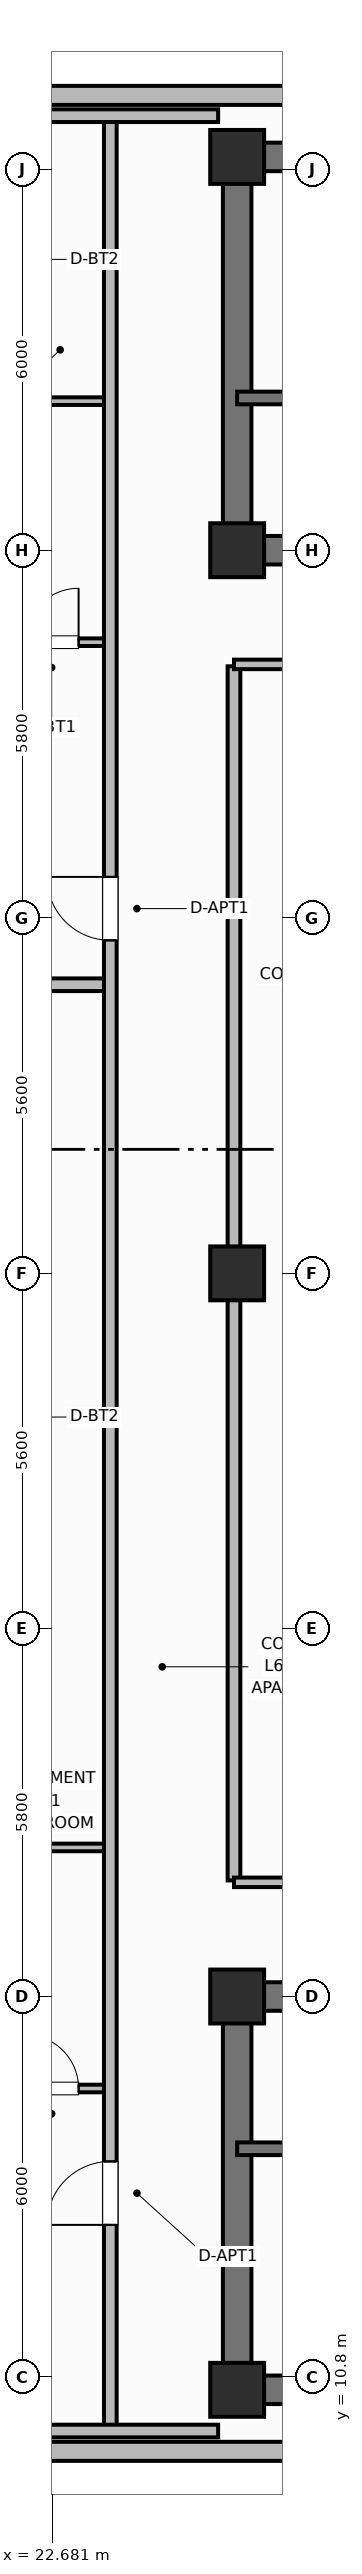
"""IFC4 building model, lengths in metres.
Left out: names, types, materials, properties, quantities, classifications, styles, units other than length and angle.
Written with IfcOpenShell. Run it as: python <this file> out.ifc"""

import sys

from ifc_helpers import new_model, si_unit, direction, frame, frame_2d, origin, origin_2d, place, context, subcontext, project, spatial, rectangle, extrude, element, fill, save


model = new_model("IFC4")
c1 = context("Model", 3, precision=1e-05, world=origin(), true_north=direction((0.0, 1.0)))
c2 = subcontext(c1, "Body", "Model", "MODEL_VIEW")
j1 = project(units=[si_unit("LENGTHUNIT", "METRE"), si_unit("PLANEANGLEUNIT", "RADIAN")], contexts=[c1])
p1 = place(None, origin())
s1 = spatial("IfcSite", under=j1, at=p1, CompositionType="ELEMENT")
p2 = place(p1, origin())
s2 = spatial("IfcBuilding", under=s1, at=p2, CompositionType="ELEMENT")
p3 = place(p2, frame((0.0, 0.0, 248.0)))
s3 = spatial("IfcBuildingStorey", under=s2, at=p3, CompositionType="ELEMENT", Elevation=248.0)
p4 = place(p3, frame((52.8, 10.6, 0.0), z_axis=(0.0, 0.0, 1.0), x_axis=(-1.0, 0.0, 0.0)))
e1 = element("IfcWall", 1, at=p4, inside=s3, PredefinedType="SHEAR", context=c2, shape_type="SweptSolid", body=[
    extrude(rectangle(XDim=27.2, YDim=0.45, at=frame_2d((13.6, 0.0))), origin(), (0.0, 0.0, 1.0), 3.7),
])
p5 = place(p3, frame((25.6, 10.825, 0.0), z_axis=(0.0, 0.0, 1.0), x_axis=(0.0, 1.0, 0.0)))
e2 = element("IfcWall", 2, at=p5, inside=s3, PredefinedType="SHEAR", context=c2, shape_type="SweptSolid", body=[
    extrude(rectangle(XDim=5.75, YDim=0.45, at=frame_2d((2.875, 0.0))), origin(), (0.0, 0.0, 1.0), 3.7),
])
p6 = place(p3, frame((25.6, 16.8, 0.0), z_axis=(0.0, 0.0, 1.0), x_axis=(1.0, 0.0, 0.0)))
e3 = element("IfcWall", 3, at=p6, inside=s3, PredefinedType="SHEAR", context=c2, shape_type="SweptSolid", body=[
    extrude(rectangle(XDim=27.2, YDim=0.45, at=frame_2d((13.6, 0.0))), origin(), (0.0, 0.0, 1.0), 3.7),
])
p7 = place(p6, frame((1.8, 0.0, 0.0)))
e4 = element("IfcOpeningElement", 4, at=p7, cuts=e3, PredefinedType="OPENING", context=c2, shape_type="SweptSolid", body=[
    extrude(rectangle(XDim=1.1, YDim=2.15, at=frame_2d((0.55, 1.075))), frame((0.0, 0.235, 0.0), z_axis=(0.0, -1.0, 0.0), x_axis=(1.0, 0.0, 0.0)), (0.0, 0.0, 1.0), 0.47),
])
p8 = place(p6, frame((5.6, 0.0, 0.0)))
e5 = element("IfcOpeningElement", 5, at=p8, cuts=e3, PredefinedType="OPENING", context=c2, shape_type="SweptSolid", body=[
    extrude(rectangle(XDim=0.85, YDim=2.1, at=frame_2d((0.425, 1.05))), frame((0.0, 0.235, 0.0), z_axis=(0.0, -1.0, 0.0), x_axis=(1.0, 0.0, 0.0)), (0.0, 0.0, 1.0), 0.47),
])
p9 = place(p6, frame((13.0, 0.0, 0.0)))
e6 = element("IfcOpeningElement", 6, at=p9, cuts=e3, PredefinedType="OPENING", context=c2, shape_type="SweptSolid", body=[
    extrude(rectangle(XDim=1.2, YDim=2.15, at=frame_2d((0.6, 1.075))), frame((0.0, 0.235, 0.0), z_axis=(0.0, -1.0, 0.0), x_axis=(1.0, 0.0, 0.0)), (0.0, 0.0, 1.0), 0.47),
])
p10 = place(p6, frame((19.2, 0.0, 0.0)))
e7 = element("IfcOpeningElement", 7, at=p10, cuts=e3, PredefinedType="OPENING", context=c2, shape_type="SweptSolid", body=[
    extrude(rectangle(XDim=0.85, YDim=2.1, at=frame_2d((0.425, 1.05))), frame((0.0, 0.235, 0.0), z_axis=(0.0, -1.0, 0.0), x_axis=(1.0, 0.0, 0.0)), (0.0, 0.0, 1.0), 0.47),
])
p11 = place(p6, frame((23.8, 0.0, 0.0)))
e8 = element("IfcOpeningElement", 8, at=p11, cuts=e3, PredefinedType="OPENING", context=c2, shape_type="SweptSolid", body=[
    extrude(rectangle(XDim=0.9, YDim=2.1, at=frame_2d((0.45, 1.05))), frame((0.0, 0.235, 0.0), z_axis=(0.0, -1.0, 0.0), x_axis=(1.0, 0.0, 0.0)), (0.0, 0.0, 1.0), 0.47),
])
p12 = place(p3, frame((25.6, 45.8, 0.0), z_axis=(0.0, 0.0, 1.0), x_axis=(1.0, 0.0, 0.0)))
e9 = element("IfcWall", 9, at=p12, inside=s3, PredefinedType="SHEAR", context=c2, shape_type="SweptSolid", body=[
    extrude(rectangle(XDim=27.2, YDim=0.45, at=frame_2d((13.6, 0.0))), origin(), (0.0, 0.0, 1.0), 3.7),
])
p13 = place(p3, frame((25.6, 39.825, 0.0), z_axis=(0.0, 0.0, 1.0), x_axis=(0.0, 1.0, 0.0)))
e10 = element("IfcWall", 10, at=p13, inside=s3, PredefinedType="SHEAR", context=c2, shape_type="SweptSolid", body=[
    extrude(rectangle(XDim=5.75, YDim=0.45, at=frame_2d((2.875, 0.0))), origin(), (0.0, 0.0, 1.0), 3.7),
])
p14 = place(p3, frame((52.8, 39.6, 0.0), z_axis=(0.0, 0.0, 1.0), x_axis=(-1.0, 0.0, 0.0)))
e11 = element("IfcWall", 11, at=p14, inside=s3, PredefinedType="SHEAR", context=c2, shape_type="SweptSolid", body=[
    extrude(rectangle(XDim=27.2, YDim=0.45, at=frame_2d((13.6, 0.0))), origin(), (0.0, 0.0, 1.0), 3.7),
])
p15 = place(p14, frame((24.2, 0.0, 0.0)))
e12 = element("IfcOpeningElement", 12, at=p15, cuts=e11, PredefinedType="OPENING", context=c2, shape_type="SweptSolid", body=[
    extrude(rectangle(XDim=1.1, YDim=2.15, at=frame_2d((0.55, 1.075))), frame((0.0, 0.235, 0.0), z_axis=(0.0, -1.0, 0.0), x_axis=(1.0, 0.0, 0.0)), (0.0, 0.0, 1.0), 0.47),
])
p16 = place(p14, frame((20.55, 0.0, 0.0)))
e13 = element("IfcOpeningElement", 13, at=p16, cuts=e11, PredefinedType="OPENING", context=c2, shape_type="SweptSolid", body=[
    extrude(rectangle(XDim=0.95, YDim=2.1, at=frame_2d((0.475, 1.05))), frame((0.0, 0.235, 0.0), z_axis=(0.0, -1.0, 0.0), x_axis=(1.0, 0.0, 0.0)), (0.0, 0.0, 1.0), 0.47),
])
p17 = place(p14, frame((15.1, 0.0, 0.0)))
e14 = element("IfcOpeningElement", 14, at=p17, cuts=e11, PredefinedType="OPENING", context=c2, shape_type="SweptSolid", body=[
    extrude(rectangle(XDim=1.2, YDim=2.15, at=frame_2d((0.6, 1.075))), frame((0.0, 0.235, 0.0), z_axis=(0.0, -1.0, 0.0), x_axis=(1.0, 0.0, 0.0)), (0.0, 0.0, 1.0), 0.47),
])
p18 = place(p14, frame((13.05, 0.0, 0.0)))
e15 = element("IfcOpeningElement", 15, at=p18, cuts=e11, PredefinedType="OPENING", context=c2, shape_type="SweptSolid", body=[
    extrude(rectangle(XDim=0.85, YDim=2.1, at=frame_2d((0.425, 1.05))), frame((0.0, 0.235, 0.0), z_axis=(0.0, -1.0, 0.0), x_axis=(1.0, 0.0, 0.0)), (0.0, 0.0, 1.0), 0.47),
])
p19 = place(p14, frame((11.0, 0.0, 0.0)))
e16 = element("IfcOpeningElement", 16, at=p19, cuts=e11, PredefinedType="OPENING", context=c2, shape_type="SweptSolid", body=[
    extrude(rectangle(XDim=0.85, YDim=2.1, at=frame_2d((0.425, 1.05))), frame((0.0, 0.235, 0.0), z_axis=(0.0, -1.0, 0.0), x_axis=(1.0, 0.0, 0.0)), (0.0, 0.0, 1.0), 0.47),
])
p20 = place(p14, frame((7.35, 0.0, 0.0)))
e17 = element("IfcOpeningElement", 17, at=p20, cuts=e11, PredefinedType="OPENING", context=c2, shape_type="SweptSolid", body=[
    extrude(rectangle(XDim=0.85, YDim=2.1, at=frame_2d((0.425, 1.05))), frame((0.0, 0.235, 0.0), z_axis=(0.0, -1.0, 0.0), x_axis=(1.0, 0.0, 0.0)), (0.0, 0.0, 1.0), 0.47),
])
p21 = place(p14, frame((4.2, 0.0, 0.0)))
e18 = element("IfcOpeningElement", 18, at=p21, cuts=e11, PredefinedType="OPENING", context=c2, shape_type="SweptSolid", body=[
    extrude(rectangle(XDim=1.3, YDim=2.2, at=frame_2d((0.65, 1.1))), frame((0.0, 0.235, 0.0), z_axis=(0.0, -1.0, 0.0), x_axis=(1.0, 0.0, 0.0)), (0.0, 0.0, 1.0), 0.47),
])
for number, where, z_axis, x_axis in (
    (19, (25.6, 10.6, 0.0), (0.0, 0.0, 1.0), (1.0, 0.0, 0.0)),
    (20, (25.6, 16.8, 0.0), (0.0, 0.0, 1.0), (1.0, 0.0, 0.0)),
    (21, (25.6, 39.6, 0.0), (0.0, 0.0, 1.0), (1.0, 0.0, 0.0)),
    (22, (25.6, 45.8, 0.0), (0.0, 0.0, 1.0), (1.0, 0.0, 0.0)),
    (23, (25.6, 28.2, 0.0), (0.0, 0.0, 1.0), (1.0, 0.0, 0.0)),
):
    element("IfcColumn", number, at=place(p3, frame(where, z_axis=z_axis, x_axis=x_axis)), inside=s3, PredefinedType="COLUMN", context=c2, shape_type="SweptSolid", body=[
        extrude(rectangle(XDim=0.85, YDim=0.85, at=origin_2d()), origin(), (0.0, 0.0, 1.0), 3.7),
    ])
p22 = place(p3, frame((22.56, 9.63, 0.0), z_axis=(0.0, 0.0, 1.0), x_axis=(1.0, 0.0, 0.0)))
e24 = element("IfcWall", 24, at=p22, inside=s3, PredefinedType="SOLIDWALL", context=c2, shape_type="SweptSolid", body=[
    extrude(rectangle(XDim=33.28, YDim=0.3, at=frame_2d((16.64, 0.0))), origin(), (0.0, 0.0, 1.0), 2.73),
])
p23 = place(p22, frame((4.311, 0.0, 0.76)))
e25 = element("IfcOpeningElement", 25, at=p23, cuts=e24, PredefinedType="OPENING", context=c2, shape_type="SweptSolid", body=[
    extrude(rectangle(XDim=1.4, YDim=1.85, at=frame_2d((0.7, 0.925))), frame((0.0, 0.16, 0.0), z_axis=(0.0, -1.0, 0.0), x_axis=(1.0, 0.0, 0.0)), (0.0, 0.0, 1.0), 0.32),
])
p24 = place(p22, frame((7.218, 0.0, 0.76)))
e26 = element("IfcOpeningElement", 26, at=p24, cuts=e24, PredefinedType="OPENING", context=c2, shape_type="SweptSolid", body=[
    extrude(rectangle(XDim=1.4, YDim=1.85, at=frame_2d((0.7, 0.925))), frame((0.0, 0.16, 0.0), z_axis=(0.0, -1.0, 0.0), x_axis=(1.0, 0.0, 0.0)), (0.0, 0.0, 1.0), 0.32),
])
p25 = place(p22, frame((9.775, 0.0, 0.76)))
e27 = element("IfcOpeningElement", 27, at=p25, cuts=e24, PredefinedType="OPENING", context=c2, shape_type="SweptSolid", body=[
    extrude(rectangle(XDim=1.4, YDim=1.85, at=frame_2d((0.7, 0.925))), frame((0.0, 0.16, 0.0), z_axis=(0.0, -1.0, 0.0), x_axis=(1.0, 0.0, 0.0)), (0.0, 0.0, 1.0), 0.32),
])
p26 = place(p22, frame((14.083, 0.0, 0.76)))
e28 = element("IfcOpeningElement", 28, at=p26, cuts=e24, PredefinedType="OPENING", context=c2, shape_type="SweptSolid", body=[
    extrude(rectangle(XDim=1.4, YDim=1.85, at=frame_2d((0.7, 0.925))), frame((0.0, 0.16, 0.0), z_axis=(0.0, -1.0, 0.0), x_axis=(1.0, 0.0, 0.0)), (0.0, 0.0, 1.0), 0.32),
])
p27 = place(p22, frame((15.94, 0.0, 0.76)))
e29 = element("IfcOpeningElement", 29, at=p27, cuts=e24, PredefinedType="OPENING", context=c2, shape_type="SweptSolid", body=[
    extrude(rectangle(XDim=1.4, YDim=1.85, at=frame_2d((0.7, 0.925))), frame((0.0, 0.16, 0.0), z_axis=(0.0, -1.0, 0.0), x_axis=(1.0, 0.0, 0.0)), (0.0, 0.0, 1.0), 0.32),
])
p28 = place(p22, frame((17.797, 0.0, 0.76)))
e30 = element("IfcOpeningElement", 30, at=p28, cuts=e24, PredefinedType="OPENING", context=c2, shape_type="SweptSolid", body=[
    extrude(rectangle(XDim=1.4, YDim=1.85, at=frame_2d((0.7, 0.925))), frame((0.0, 0.16, 0.0), z_axis=(0.0, -1.0, 0.0), x_axis=(1.0, 0.0, 0.0)), (0.0, 0.0, 1.0), 0.32),
])
p29 = place(p22, frame((22.104, 0.0, 0.76)))
e31 = element("IfcOpeningElement", 31, at=p29, cuts=e24, PredefinedType="OPENING", context=c2, shape_type="SweptSolid", body=[
    extrude(rectangle(XDim=1.4, YDim=1.85, at=frame_2d((0.7, 0.925))), frame((0.0, 0.16, 0.0), z_axis=(0.0, -1.0, 0.0), x_axis=(1.0, 0.0, 0.0)), (0.0, 0.0, 1.0), 0.32),
])
p30 = place(p22, frame((24.662, 0.0, 0.76)))
e32 = element("IfcOpeningElement", 32, at=p30, cuts=e24, PredefinedType="OPENING", context=c2, shape_type="SweptSolid", body=[
    extrude(rectangle(XDim=1.4, YDim=1.85, at=frame_2d((0.7, 0.925))), frame((0.0, 0.16, 0.0), z_axis=(0.0, -1.0, 0.0), x_axis=(1.0, 0.0, 0.0)), (0.0, 0.0, 1.0), 0.32),
])
p31 = place(p22, frame((27.569, 0.0, 0.76)))
e33 = element("IfcOpeningElement", 33, at=p31, cuts=e24, PredefinedType="OPENING", context=c2, shape_type="SweptSolid", body=[
    extrude(rectangle(XDim=1.4, YDim=1.85, at=frame_2d((0.7, 0.925))), frame((0.0, 0.16, 0.0), z_axis=(0.0, -1.0, 0.0), x_axis=(1.0, 0.0, 0.0)), (0.0, 0.0, 1.0), 0.32),
])
p32 = place(p3, frame((55.84, 46.77, 0.0), z_axis=(0.0, 0.0, 1.0), x_axis=(-1.0, 0.0, 0.0)))
e34 = element("IfcWall", 34, at=p32, inside=s3, PredefinedType="SOLIDWALL", context=c2, shape_type="SweptSolid", body=[
    extrude(rectangle(XDim=33.28, YDim=0.3, at=frame_2d((16.64, 0.0))), origin(), (0.0, 0.0, 1.0), 2.73),
])
p33 = place(p32, frame((4.547, 0.0, 0.76)))
e35 = element("IfcOpeningElement", 35, at=p33, cuts=e34, PredefinedType="OPENING", context=c2, shape_type="SweptSolid", body=[
    extrude(rectangle(XDim=1.8, YDim=1.85, at=frame_2d((0.9, 0.925))), frame((0.0, 0.16, 0.0), z_axis=(0.0, -1.0, 0.0), x_axis=(1.0, 0.0, 0.0)), (0.0, 0.0, 1.0), 0.32),
])
p34 = place(p32, frame((7.745, 0.0, 0.76)))
e36 = element("IfcOpeningElement", 36, at=p34, cuts=e34, PredefinedType="OPENING", context=c2, shape_type="SweptSolid", body=[
    extrude(rectangle(XDim=1.8, YDim=1.85, at=frame_2d((0.9, 0.925))), frame((0.0, 0.16, 0.0), z_axis=(0.0, -1.0, 0.0), x_axis=(1.0, 0.0, 0.0)), (0.0, 0.0, 1.0), 0.32),
])
p35 = place(p32, frame((14.141, 0.0, 0.76)))
e37 = element("IfcOpeningElement", 37, at=p35, cuts=e34, PredefinedType="OPENING", context=c2, shape_type="SweptSolid", body=[
    extrude(rectangle(XDim=1.8, YDim=1.85, at=frame_2d((0.9, 0.925))), frame((0.0, 0.16, 0.0), z_axis=(0.0, -1.0, 0.0), x_axis=(1.0, 0.0, 0.0)), (0.0, 0.0, 1.0), 0.32),
])
p36 = place(p32, frame((17.339, 0.0, 0.76)))
e38 = element("IfcOpeningElement", 38, at=p36, cuts=e34, PredefinedType="OPENING", context=c2, shape_type="SweptSolid", body=[
    extrude(rectangle(XDim=1.8, YDim=1.85, at=frame_2d((0.9, 0.925))), frame((0.0, 0.16, 0.0), z_axis=(0.0, -1.0, 0.0), x_axis=(1.0, 0.0, 0.0)), (0.0, 0.0, 1.0), 0.32),
])
p37 = place(p32, frame((23.735, 0.0, 0.76)))
e39 = element("IfcOpeningElement", 39, at=p37, cuts=e34, PredefinedType="OPENING", context=c2, shape_type="SweptSolid", body=[
    extrude(rectangle(XDim=1.8, YDim=1.85, at=frame_2d((0.9, 0.925))), frame((0.0, 0.16, 0.0), z_axis=(0.0, -1.0, 0.0), x_axis=(1.0, 0.0, 0.0)), (0.0, 0.0, 1.0), 0.32),
])
p38 = place(p32, frame((26.933, 0.0, 0.76)))
e40 = element("IfcOpeningElement", 40, at=p38, cuts=e34, PredefinedType="OPENING", context=c2, shape_type="SweptSolid", body=[
    extrude(rectangle(XDim=1.8, YDim=1.85, at=frame_2d((0.9, 0.925))), frame((0.0, 0.16, 0.0), z_axis=(0.0, -1.0, 0.0), x_axis=(1.0, 0.0, 0.0)), (0.0, 0.0, 1.0), 0.32),
])
p39 = place(p3, frame((25.6, 14.4, 0.0), z_axis=(0.0, 0.0, 1.0), x_axis=(1.0, 0.0, 0.0)))
e41 = element("IfcWall", 41, at=p39, inside=s3, PredefinedType="SHEAR", context=c2, shape_type="SweptSolid", body=[
    extrude(rectangle(XDim=9.55, YDim=0.2, at=frame_2d((4.775, 0.0))), origin(), (0.0, 0.0, 1.0), 3.7),
])
p40 = place(p39, frame((1.05, 0.0, 0.0)))
e42 = element("IfcOpeningElement", 42, at=p40, cuts=e41, PredefinedType="OPENING", context=c2, shape_type="SweptSolid", body=[
    extrude(rectangle(XDim=1.1, YDim=2.15, at=frame_2d((0.55, 1.075))), frame((0.0, 0.11, 0.0), z_axis=(0.0, -1.0, 0.0), x_axis=(1.0, 0.0, 0.0)), (0.0, 0.0, 1.0), 0.22),
])
p41 = place(p3, frame((35.15, 42.0, 0.0), z_axis=(0.0, 0.0, 1.0), x_axis=(-1.0, 0.0, 0.0)))
e43 = element("IfcWall", 43, at=p41, inside=s3, PredefinedType="SHEAR", context=c2, shape_type="SweptSolid", body=[
    extrude(rectangle(XDim=9.55, YDim=0.2, at=frame_2d((4.775, 0.0))), origin(), (0.0, 0.0, 1.0), 3.7),
])
p42 = place(p41, frame((7.25, 0.0, 0.0)))
e44 = element("IfcOpeningElement", 44, at=p42, cuts=e43, PredefinedType="OPENING", context=c2, shape_type="SweptSolid", body=[
    extrude(rectangle(XDim=1.1, YDim=2.15, at=frame_2d((0.55, 1.075))), frame((0.0, 0.11, 0.0), z_axis=(0.0, -1.0, 0.0), x_axis=(1.0, 0.0, 0.0)), (0.0, 0.0, 1.0), 0.22),
])
p43 = place(p3, frame((25.55, 18.63, 0.0), z_axis=(0.0, 0.0, 1.0), x_axis=(0.0, 1.0, 0.0)))
e45 = element("IfcWall", 45, at=p43, inside=s3, PredefinedType="PARTITIONING", context=c2, shape_type="SweptSolid", body=[
    extrude(rectangle(XDim=19.14, YDim=0.2, at=frame_2d((9.57, 0.0))), origin(), (0.0, 0.0, 1.0), 2.56),
])
for number, where, z_axis, x_axis in (
    (46, (25.55, 18.6, 0.0), (0.0, 0.0, 1.0), (1.0, 0.0, 0.0)),
    (47, (25.55, 37.8, 0.0), (0.0, 0.0, 1.0), (1.0, 0.0, 0.0)),
):
    element("IfcWall", number, at=place(p3, frame(where, z_axis=z_axis, x_axis=x_axis)), inside=s3, PredefinedType="PARTITIONING", context=c2, shape_type="SweptSolid", body=[
        extrude(rectangle(XDim=3.5, YDim=0.15, at=frame_2d((1.75, 0.0))), origin(), (0.0, 0.0, 1.0), 2.56),
    ])
p44 = place(p3, frame((21.65, 15.35, 0.0), z_axis=(0.0, 0.0, 1.0), x_axis=(1.0, 0.0, 0.0)))
e48 = element("IfcWall", 48, at=p44, inside=s3, PredefinedType="PARTITIONING", context=c2, shape_type="SweptSolid", body=[
    extrude(rectangle(XDim=1.95, YDim=0.12, at=frame_2d((0.975, 0.0))), origin(), (0.0, 0.0, 1.0), 2.56),
])
p45 = place(p44, frame((0.6, 0.0, 0.0)))
e49 = element("IfcOpeningElement", 49, at=p45, cuts=e48, PredefinedType="OPENING", context=c2, shape_type="SweptSolid", body=[
    extrude(rectangle(XDim=0.85, YDim=2.1, at=frame_2d((0.425, 1.05))), frame((0.0, 0.07, 0.0), z_axis=(0.0, -1.0, 0.0), x_axis=(1.0, 0.0, 0.0)), (0.0, 0.0, 1.0), 0.14),
])
p46 = place(p3, frame((21.65, 19.15, 0.0), z_axis=(0.0, 0.0, 1.0), x_axis=(1.0, 0.0, 0.0)))
e50 = element("IfcWall", 50, at=p46, inside=s3, PredefinedType="PARTITIONING", context=c2, shape_type="SweptSolid", body=[
    extrude(rectangle(XDim=1.95, YDim=0.12, at=frame_2d((0.975, 0.0))), origin(), (0.0, 0.0, 1.0), 2.56),
])
p47 = place(p3, frame((19.53, 32.75, 0.0), z_axis=(0.0, 0.0, 1.0), x_axis=(1.0, 0.0, 0.0)))
e51 = element("IfcWall", 51, at=p47, inside=s3, PredefinedType="PARTITIONING", context=c2, shape_type="SweptSolid", body=[
    extrude(rectangle(XDim=4.07, YDim=0.2, at=frame_2d((2.035, 0.0))), origin(), (0.0, 0.0, 1.0), 2.56),
])
p48 = place(p3, frame((21.65, 38.15, 0.0), z_axis=(0.0, 0.0, 1.0), x_axis=(1.0, 0.0, 0.0)))
e52 = element("IfcWall", 52, at=p48, inside=s3, PredefinedType="PARTITIONING", context=c2, shape_type="SweptSolid", body=[
    extrude(rectangle(XDim=1.95, YDim=0.12, at=frame_2d((0.975, 0.0))), origin(), (0.0, 0.0, 1.0), 2.56),
])
p49 = place(p48, frame((0.6, 0.0, 0.0)))
e53 = element("IfcOpeningElement", 53, at=p49, cuts=e52, PredefinedType="OPENING", context=c2, shape_type="SweptSolid", body=[
    extrude(rectangle(XDim=0.85, YDim=2.1, at=frame_2d((0.425, 1.05))), frame((0.0, 0.07, 0.0), z_axis=(0.0, -1.0, 0.0), x_axis=(1.0, 0.0, 0.0)), (0.0, 0.0, 1.0), 0.14),
])
p50 = place(p3, frame((21.65, 41.95, 0.0), z_axis=(0.0, 0.0, 1.0), x_axis=(1.0, 0.0, 0.0)))
e54 = element("IfcWall", 54, at=p50, inside=s3, PredefinedType="PARTITIONING", context=c2, shape_type="SweptSolid", body=[
    extrude(rectangle(XDim=1.95, YDim=0.12, at=frame_2d((0.975, 0.0))), origin(), (0.0, 0.0, 1.0), 2.56),
])
p51 = place(p3, frame((23.6, 9.95, 0.0), z_axis=(0.0, 0.0, 1.0), x_axis=(0.0, 1.0, 0.0)))
e55 = element("IfcWall", 55, at=p51, inside=s3, PredefinedType="PARTITIONING", context=c2, shape_type="SweptSolid", body=[
    extrude(rectangle(XDim=36.5, YDim=0.2, at=frame_2d((18.25, 0.0))), origin(), (0.0, 0.0, 1.0), 2.56),
])
p52 = place(p51, frame((3.25, 0.0, 0.0)))
e56 = element("IfcOpeningElement", 56, at=p52, cuts=e55, PredefinedType="OPENING", context=c2, shape_type="SweptSolid", body=[
    extrude(rectangle(XDim=1.0, YDim=2.15, at=frame_2d((0.5, 1.075))), frame((0.0, 0.11, 0.0), z_axis=(0.0, -1.0, 0.0), x_axis=(1.0, 0.0, 0.0)), (0.0, 0.0, 1.0), 0.22),
])
p53 = place(p51, frame((23.5, 0.0, 0.0)))
e57 = element("IfcOpeningElement", 57, at=p53, cuts=e55, PredefinedType="OPENING", context=c2, shape_type="SweptSolid", body=[
    extrude(rectangle(XDim=1.0, YDim=2.15, at=frame_2d((0.5, 1.075))), frame((0.0, 0.11, 0.0), z_axis=(0.0, -1.0, 0.0), x_axis=(1.0, 0.0, 0.0)), (0.0, 0.0, 1.0), 0.22),
])
for number, where, z_axis, x_axis in (
    (58, (21.546, 9.95, 0.0), (0.0, 0.0, 1.0), (1.0, 0.0, 0.0)),
    (59, (21.546, 46.45, 0.0), (0.0, 0.0, 1.0), (1.0, 0.0, 0.0)),
):
    element("IfcWall", number, at=place(p3, frame(where, z_axis=z_axis, x_axis=x_axis)), inside=s3, PredefinedType="PARTITIONING", context=c2, shape_type="SweptSolid", body=[
        extrude(rectangle(XDim=3.754, YDim=0.2, at=frame_2d((1.877, 0.0))), origin(), (0.0, 0.0, 1.0), 2.56),
    ])
p54 = place(p45, origin())
e60 = element("IfcDoor", 60, at=p54, inside=s3, OperationType="SINGLE_SWING_LEFT", PredefinedType="DOOR", context=c2, shape_type="SweptSolid", body=[
    extrude(rectangle(XDim=0.85, YDim=2.1, at=frame_2d((0.425, 1.05))), frame((0.0, 0.025, 0.0), z_axis=(0.0, -1.0, 0.0), x_axis=(1.0, 0.0, 0.0)), (0.0, 0.0, 1.0), 0.05),
])
fill(e49, e60)
p55 = place(p49, origin())
e61 = element("IfcDoor", 61, at=p55, inside=s3, OperationType="SINGLE_SWING_RIGHT", PredefinedType="DOOR", context=c2, shape_type="SweptSolid", body=[
    extrude(rectangle(XDim=0.85, YDim=2.1, at=frame_2d((0.425, 1.05))), frame((0.0, 0.025, 0.0), z_axis=(0.0, -1.0, 0.0), x_axis=(1.0, 0.0, 0.0)), (0.0, 0.0, 1.0), 0.05),
])
fill(e53, e61)
p56 = place(p52, origin())
e62 = element("IfcDoor", 62, at=p56, inside=s3, OperationType="SINGLE_SWING_LEFT", PredefinedType="DOOR", context=c2, shape_type="SweptSolid", body=[
    extrude(rectangle(XDim=1.0, YDim=2.15, at=frame_2d((0.5, 1.075))), frame((0.0, 0.025, 0.0), z_axis=(0.0, -1.0, 0.0), x_axis=(1.0, 0.0, 0.0)), (0.0, 0.0, 1.0), 0.05),
])
fill(e56, e62)
p57 = place(p53, origin())
e63 = element("IfcDoor", 63, at=p57, inside=s3, OperationType="SINGLE_SWING_RIGHT", PredefinedType="DOOR", context=c2, shape_type="SweptSolid", body=[
    extrude(rectangle(XDim=1.0, YDim=2.15, at=frame_2d((0.5, 1.075))), frame((0.0, 0.025, 0.0), z_axis=(0.0, -1.0, 0.0), x_axis=(1.0, 0.0, 0.0)), (0.0, 0.0, 1.0), 0.05),
])
fill(e57, e63)
save(model, sys.argv[1])
